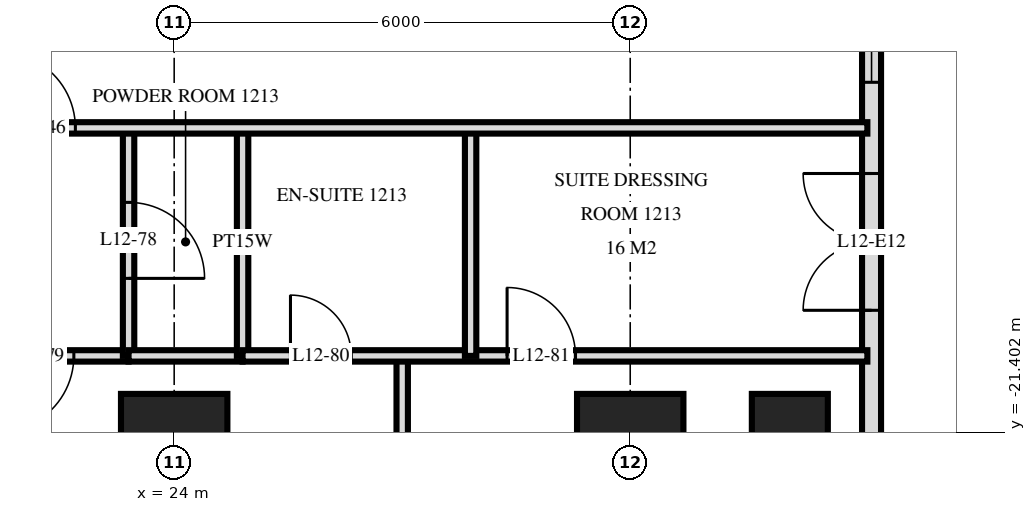
"""IFC4 building model, lengths in metres.
Left out: names, types, materials, properties, quantities, classifications, styles, units other than length and angle.
Written with IfcOpenShell. Run it as: python <this file> out.ifc"""

import sys

from ifc_helpers import new_model, si_unit, direction, frame, frame_2d, origin, origin_2d, place, context, subcontext, project, spatial, rectangle, extrude, element, fill, save


model = new_model("IFC4")
c1 = context("Model", 3, precision=1e-05, world=origin(), true_north=direction((0.0, 1.0)))
c2 = subcontext(c1, "Body", "Model", "MODEL_VIEW")
j1 = project(units=[si_unit("LENGTHUNIT", "METRE"), si_unit("PLANEANGLEUNIT", "RADIAN")], contexts=[c1])
p1 = place(None, origin())
s1 = spatial("IfcSite", under=j1, at=p1, CompositionType="ELEMENT")
p2 = place(p1, origin())
s2 = spatial("IfcBuilding", under=s1, at=p2, CompositionType="ELEMENT")
p3 = place(p2, frame((0.0, 0.0, 52.8)))
s3 = spatial("IfcBuildingStorey", under=s2, at=p3, CompositionType="ELEMENT", Elevation=52.8)
for number, where, z_axis, x_axis in (
    (1, (24.0, -21.6, 0.0), (0.0, 0.0, 1.0), (1.0, 0.0, 0.0)),
    (2, (30.0, -21.6, 0.0), (0.0, 0.0, 1.0), (1.0, 0.0, 0.0)),
):
    element("IfcColumn", number, at=place(p3, frame(where, z_axis=z_axis, x_axis=x_axis)), inside=s3, PredefinedType="COLUMN", context=c2, shape_type="SweptSolid", body=[
        extrude(rectangle(XDim=1.4, YDim=1.4, at=origin_2d()), origin(), (0.0, 0.0, 1.0), 3.6),
    ])
p4 = place(p3, frame((32.1, -21.6, 0.0), z_axis=(0.0, 0.0, 1.0), x_axis=(0.0, 1.0, 0.0)))
e3 = element("IfcColumn", 3, at=p4, inside=s3, PredefinedType="COLUMN", context=c2, shape_type="SweptSolid", body=[
    extrude(rectangle(XDim=1.4, YDim=1.0, at=origin_2d()), origin(), (0.0, 0.0, 1.0), 3.6),
])
p5 = place(p3, frame((33.175, -24.875, 0.0), z_axis=(0.0, 0.0, 1.0), x_axis=(0.0, 1.0, 0.0)))
e4 = element("IfcWall", 4, at=p5, inside=s3, PredefinedType="SOLIDWALL", context=c2, shape_type="SweptSolid", body=[
    extrude(rectangle(XDim=21.551, YDim=0.25, at=frame_2d((10.775, 0.0))), origin(), (0.0, 0.0, 1.0), 3.32),
])
p6 = place(p5, frame((0.575, 0.0, 0.0)))
e5 = element("IfcOpeningElement", 5, at=p6, cuts=e4, PredefinedType="OPENING", context=c2, shape_type="SweptSolid", body=[
    extrude(rectangle(XDim=1.8, YDim=2.4, at=frame_2d((0.9, 1.2))), frame((0.0, 0.135, 0.0), z_axis=(0.0, -1.0, 0.0), x_axis=(1.0, 0.0, 0.0)), (0.0, 0.0, 1.0), 0.27),
])
p7 = place(p5, frame((5.075, 0.0, 0.0)))
e6 = element("IfcOpeningElement", 6, at=p7, cuts=e4, PredefinedType="OPENING", context=c2, shape_type="SweptSolid", body=[
    extrude(rectangle(XDim=1.8, YDim=2.4, at=frame_2d((0.9, 1.2))), frame((0.0, 0.135, 0.0), z_axis=(0.0, -1.0, 0.0), x_axis=(1.0, 0.0, 0.0)), (0.0, 0.0, 1.0), 0.27),
])
p8 = place(p5, frame((8.075, 0.0, 0.3)))
e7 = element("IfcOpeningElement", 7, at=p8, cuts=e4, PredefinedType="OPENING", context=c2, shape_type="SweptSolid", body=[
    extrude(rectangle(XDim=1.2, YDim=2.1, at=frame_2d((0.6, 1.05))), frame((0.0, 0.135, 0.0), z_axis=(0.0, -1.0, 0.0), x_axis=(1.0, 0.0, 0.0)), (0.0, 0.0, 1.0), 0.27),
])
p9 = place(p5, frame((13.1, 0.0, 0.0)))
e8 = element("IfcOpeningElement", 8, at=p9, cuts=e4, PredefinedType="OPENING", context=c2, shape_type="SweptSolid", body=[
    extrude(rectangle(XDim=1.8, YDim=2.4, at=frame_2d((0.9, 1.2))), frame((0.0, 0.135, 0.0), z_axis=(0.0, -1.0, 0.0), x_axis=(1.0, 0.0, 0.0)), (0.0, 0.0, 1.0), 0.27),
])
p10 = place(p3, frame((27.9, -20.4, 0.0), z_axis=(0.0, 0.0, 1.0), x_axis=(0.0, 1.0, 0.0)))
e9 = element("IfcWall", 9, at=p10, inside=s3, PredefinedType="PARTITIONING", context=c2, shape_type="SweptSolid", body=[
    extrude(rectangle(XDim=3.0, YDim=0.15, at=frame_2d((1.5, 0.0))), origin(), (0.0, 0.0, 1.0), 3.32),
])
p11 = place(p3, frame((27.0, -29.22, 0.0), z_axis=(0.0, 0.0, 1.0), x_axis=(0.0, 1.0, 0.0)))
e10 = element("IfcWall", 10, at=p11, inside=s3, PredefinedType="PARTITIONING", context=c2, shape_type="SweptSolid", body=[
    extrude(rectangle(XDim=8.82, YDim=0.15, at=frame_2d((4.41, 0.0))), origin(), (0.0, 0.0, 1.0), 3.32),
])
p12 = place(p11, frame((3.87, 0.0, 0.0)))
e11 = element("IfcOpeningElement", 11, at=p12, cuts=e10, PredefinedType="OPENING", context=c2, shape_type="SweptSolid", body=[
    extrude(rectangle(XDim=0.9, YDim=2.1, at=frame_2d((0.45, 1.05))), frame((0.0, 0.085, 0.0), z_axis=(0.0, -1.0, 0.0), x_axis=(1.0, 0.0, 0.0)), (0.0, 0.0, 1.0), 0.17),
])
p13 = place(p3, frame((24.9, -20.4, 0.0), z_axis=(0.0, 0.0, 1.0), x_axis=(0.0, 1.0, 0.0)))
e12 = element("IfcWall", 12, at=p13, inside=s3, PredefinedType="PLUMBINGWALL", context=c2, shape_type="SweptSolid", body=[
    extrude(rectangle(XDim=3.0, YDim=0.15, at=frame_2d((1.5, 0.0))), origin(), (0.0, 0.0, 1.0), 3.32),
])
p14 = place(p3, frame((23.4, -20.4, 0.0), z_axis=(0.0, 0.0, 1.0), x_axis=(0.0, 1.0, 0.0)))
e13 = element("IfcWall", 13, at=p14, inside=s3, PredefinedType="PARTITIONING", context=c2, shape_type="SweptSolid", body=[
    extrude(rectangle(XDim=3.0, YDim=0.15, at=frame_2d((1.5, 0.0))), origin(), (0.0, 0.0, 1.0), 3.32),
])
p15 = place(p14, frame((1.02, 0.0, 0.0)))
e14 = element("IfcOpeningElement", 14, at=p15, cuts=e13, PredefinedType="OPENING", context=c2, shape_type="SweptSolid", body=[
    extrude(rectangle(XDim=1.0, YDim=2.1, at=frame_2d((0.5, 1.05))), frame((0.0, 0.085, 0.0), z_axis=(0.0, -1.0, 0.0), x_axis=(1.0, 0.0, 0.0)), (0.0, 0.0, 1.0), 0.17),
])
p16 = place(p3, frame((21.0, -20.4, 0.0), z_axis=(0.0, 0.0, 1.0), x_axis=(1.0, 0.0, 0.0)))
e15 = element("IfcWall", 15, at=p16, inside=s3, PredefinedType="PARTITIONING", context=c2, shape_type="SweptSolid", body=[
    extrude(rectangle(XDim=2.4, YDim=0.15, at=frame_2d((1.2, 0.0))), origin(), (0.0, 0.0, 1.0), 3.32),
])
p17 = place(p16, frame((0.68, 0.0, 0.0)))
e16 = element("IfcOpeningElement", 16, at=p17, cuts=e15, PredefinedType="OPENING", context=c2, shape_type="SweptSolid", body=[
    extrude(rectangle(XDim=1.0, YDim=2.1, at=frame_2d((0.5, 1.05))), frame((0.0, 0.085, 0.0), z_axis=(0.0, -1.0, 0.0), x_axis=(1.0, 0.0, 0.0)), (0.0, 0.0, 1.0), 0.17),
])
p18 = place(p3, frame((24.9, -20.4, 0.0), z_axis=(0.0, 0.0, 1.0), x_axis=(1.0, 0.0, 0.0)))
e17 = element("IfcWall", 17, at=p18, inside=s3, PredefinedType="PARTITIONING", context=c2, shape_type="SweptSolid", body=[
    extrude(rectangle(XDim=8.22, YDim=0.15, at=frame_2d((4.11, 0.0))), origin(), (0.0, 0.0, 1.0), 3.32),
])
p19 = place(p18, frame((0.63, 0.0, 0.0)))
e18 = element("IfcOpeningElement", 18, at=p19, cuts=e17, PredefinedType="OPENING", context=c2, shape_type="SweptSolid", body=[
    extrude(rectangle(XDim=0.8, YDim=2.1, at=frame_2d((0.4, 1.05))), frame((0.0, 0.085, 0.0), z_axis=(0.0, -1.0, 0.0), x_axis=(1.0, 0.0, 0.0)), (0.0, 0.0, 1.0), 0.17),
])
p20 = place(p18, frame((3.48, 0.0, 0.0)))
e19 = element("IfcOpeningElement", 19, at=p20, cuts=e17, PredefinedType="OPENING", context=c2, shape_type="SweptSolid", body=[
    extrude(rectangle(XDim=0.9, YDim=2.1, at=frame_2d((0.45, 1.05))), frame((0.0, 0.085, 0.0), z_axis=(0.0, -1.0, 0.0), x_axis=(1.0, 0.0, 0.0)), (0.0, 0.0, 1.0), 0.17),
])
p21 = place(p3, frame((23.4, -20.4, 0.0), z_axis=(0.0, 0.0, 1.0), x_axis=(1.0, 0.0, 0.0)))
e20 = element("IfcWall", 20, at=p21, inside=s3, PredefinedType="PLUMBINGWALL", context=c2, shape_type="SweptSolid", body=[
    extrude(rectangle(XDim=1.5, YDim=0.15, at=frame_2d((0.75, 0.0))), origin(), (0.0, 0.0, 1.0), 3.32),
])
p22 = place(p3, frame((-33.12, -17.4, 0.0), z_axis=(0.0, 0.0, 1.0), x_axis=(1.0, 0.0, 0.0)))
e21 = element("IfcWall", 21, at=p22, inside=s3, PredefinedType="PARTITIONING", context=c2, shape_type="SweptSolid", body=[
    extrude(rectangle(XDim=66.24, YDim=0.15, at=frame_2d((33.12, 0.0))), origin(), (0.0, 0.0, 1.0), 3.32),
])
p23 = place(p22, frame((9.27, 0.0, 0.0)))
e22 = element("IfcOpeningElement", 22, at=p23, cuts=e21, PredefinedType="OPENING", context=c2, shape_type="SweptSolid", body=[
    extrude(rectangle(XDim=1.0, YDim=2.1, at=frame_2d((0.5, 1.05))), frame((0.0, 0.085, 0.0), z_axis=(0.0, -1.0, 0.0), x_axis=(1.0, 0.0, 0.0)), (0.0, 0.0, 1.0), 0.17),
])
p24 = place(p22, frame((13.97, 0.0, 0.0)))
e23 = element("IfcOpeningElement", 23, at=p24, cuts=e21, PredefinedType="OPENING", context=c2, shape_type="SweptSolid", body=[
    extrude(rectangle(XDim=1.0, YDim=2.1, at=frame_2d((0.5, 1.05))), frame((0.0, 0.085, 0.0), z_axis=(0.0, -1.0, 0.0), x_axis=(1.0, 0.0, 0.0)), (0.0, 0.0, 1.0), 0.17),
])
p25 = place(p22, frame((15.27, 0.0, 0.0)))
e24 = element("IfcOpeningElement", 24, at=p25, cuts=e21, PredefinedType="OPENING", context=c2, shape_type="SweptSolid", body=[
    extrude(rectangle(XDim=1.0, YDim=2.1, at=frame_2d((0.5, 1.05))), frame((0.0, 0.085, 0.0), z_axis=(0.0, -1.0, 0.0), x_axis=(1.0, 0.0, 0.0)), (0.0, 0.0, 1.0), 0.17),
])
p26 = place(p22, frame((19.97, 0.0, 0.0)))
e25 = element("IfcOpeningElement", 25, at=p26, cuts=e21, PredefinedType="OPENING", context=c2, shape_type="SweptSolid", body=[
    extrude(rectangle(XDim=1.0, YDim=2.1, at=frame_2d((0.5, 1.05))), frame((0.0, 0.085, 0.0), z_axis=(0.0, -1.0, 0.0), x_axis=(1.0, 0.0, 0.0)), (0.0, 0.0, 1.0), 0.17),
])
p27 = place(p22, frame((22.27, 0.0, 0.0)))
e26 = element("IfcOpeningElement", 26, at=p27, cuts=e21, PredefinedType="OPENING", context=c2, shape_type="SweptSolid", body=[
    extrude(rectangle(XDim=1.0, YDim=2.1, at=frame_2d((0.5, 1.05))), frame((0.0, 0.085, 0.0), z_axis=(0.0, -1.0, 0.0), x_axis=(1.0, 0.0, 0.0)), (0.0, 0.0, 1.0), 0.17),
])
p28 = place(p22, frame((28.97, 0.0, 0.0)))
e27 = element("IfcOpeningElement", 27, at=p28, cuts=e21, PredefinedType="OPENING", context=c2, shape_type="SweptSolid", body=[
    extrude(rectangle(XDim=1.0, YDim=2.1, at=frame_2d((0.5, 1.05))), frame((0.0, 0.085, 0.0), z_axis=(0.0, -1.0, 0.0), x_axis=(1.0, 0.0, 0.0)), (0.0, 0.0, 1.0), 0.17),
])
p29 = place(p22, frame((30.27, 0.0, 0.0)))
e28 = element("IfcOpeningElement", 28, at=p29, cuts=e21, PredefinedType="OPENING", context=c2, shape_type="SweptSolid", body=[
    extrude(rectangle(XDim=1.0, YDim=2.1, at=frame_2d((0.5, 1.05))), frame((0.0, 0.085, 0.0), z_axis=(0.0, -1.0, 0.0), x_axis=(1.0, 0.0, 0.0)), (0.0, 0.0, 1.0), 0.17),
])
p30 = place(p22, frame((34.97, 0.0, 0.0)))
e29 = element("IfcOpeningElement", 29, at=p30, cuts=e21, PredefinedType="OPENING", context=c2, shape_type="SweptSolid", body=[
    extrude(rectangle(XDim=1.0, YDim=2.1, at=frame_2d((0.5, 1.05))), frame((0.0, 0.085, 0.0), z_axis=(0.0, -1.0, 0.0), x_axis=(1.0, 0.0, 0.0)), (0.0, 0.0, 1.0), 0.17),
])
p31 = place(p22, frame((36.27, 0.0, 0.0)))
e30 = element("IfcOpeningElement", 30, at=p31, cuts=e21, PredefinedType="OPENING", context=c2, shape_type="SweptSolid", body=[
    extrude(rectangle(XDim=1.0, YDim=2.1, at=frame_2d((0.5, 1.05))), frame((0.0, 0.085, 0.0), z_axis=(0.0, -1.0, 0.0), x_axis=(1.0, 0.0, 0.0)), (0.0, 0.0, 1.0), 0.17),
])
p32 = place(p22, frame((39.82, 0.0, 0.0)))
e31 = element("IfcOpeningElement", 31, at=p32, cuts=e21, PredefinedType="OPENING", context=c2, shape_type="SweptSolid", body=[
    extrude(rectangle(XDim=1.0, YDim=2.1, at=frame_2d((0.5, 1.05))), frame((0.0, 0.085, 0.0), z_axis=(0.0, -1.0, 0.0), x_axis=(1.0, 0.0, 0.0)), (0.0, 0.0, 1.0), 0.17),
])
p33 = place(p22, frame((51.27, 0.0, 0.0)))
e32 = element("IfcOpeningElement", 32, at=p33, cuts=e21, PredefinedType="OPENING", context=c2, shape_type="SweptSolid", body=[
    extrude(rectangle(XDim=1.0, YDim=2.1, at=frame_2d((0.5, 1.05))), frame((0.0, 0.085, 0.0), z_axis=(0.0, -1.0, 0.0), x_axis=(1.0, 0.0, 0.0)), (0.0, 0.0, 1.0), 0.17),
])
p34 = place(p22, frame((4.42, 0.0, 0.0)))
e33 = element("IfcOpeningElement", 33, at=p34, cuts=e21, PredefinedType="OPENING", context=c2, shape_type="SweptSolid", body=[
    extrude(rectangle(XDim=1.0, YDim=2.1, at=frame_2d((0.5, 1.05))), frame((0.0, 0.085, 0.0), z_axis=(0.0, -1.0, 0.0), x_axis=(1.0, 0.0, 0.0)), (0.0, 0.0, 1.0), 0.17),
])
p35 = place(p22, frame((54.82, 0.0, 0.0)))
e34 = element("IfcOpeningElement", 34, at=p35, cuts=e21, PredefinedType="OPENING", context=c2, shape_type="SweptSolid", body=[
    extrude(rectangle(XDim=1.0, YDim=2.1, at=frame_2d((0.5, 1.05))), frame((0.0, 0.085, 0.0), z_axis=(0.0, -1.0, 0.0), x_axis=(1.0, 0.0, 0.0)), (0.0, 0.0, 1.0), 0.17),
])
p36 = place(p7, origin())
e35 = element("IfcDoor", 35, at=p36, inside=s3, OperationType="DOUBLE_DOOR_SINGLE_SWING", PredefinedType="DOOR", context=c2, shape_type="SweptSolid", body=[
    extrude(rectangle(XDim=1.8, YDim=2.4, at=frame_2d((0.9, 1.2))), frame((0.0, 0.025, 0.0), z_axis=(0.0, -1.0, 0.0), x_axis=(1.0, 0.0, 0.0)), (0.0, 0.0, 1.0), 0.05),
])
fill(e6, e35)
p37 = place(p8, origin())
e36 = element("IfcWindow", 36, at=p37, inside=s3, PartitioningType="SINGLE_PANEL", PredefinedType="WINDOW", context=c2, shape_type="SweptSolid", body=[
    extrude(rectangle(XDim=1.2, YDim=2.1, at=frame_2d((0.6, 1.05))), frame((0.0, 0.03, 0.0), z_axis=(0.0, -1.0, 0.0), x_axis=(1.0, 0.0, 0.0)), (0.0, 0.0, 1.0), 0.06),
])
fill(e7, e36)
p38 = place(p35, origin())
e37 = element("IfcDoor", 37, at=p38, inside=s3, OperationType="SINGLE_SWING_RIGHT", PredefinedType="DOOR", context=c2, shape_type="SweptSolid", body=[
    extrude(rectangle(XDim=1.0, YDim=2.1, at=frame_2d((0.5, 1.05))), frame((0.0, 0.025, 0.0), z_axis=(0.0, -1.0, 0.0), x_axis=(1.0, 0.0, 0.0)), (0.0, 0.0, 1.0), 0.05),
])
fill(e34, e37)
p39 = place(p15, frame((0.5, 0.0, 0.0), z_axis=(0.0, 0.0, 1.0), x_axis=(-1.0, 0.0, 0.0)))
e38 = element("IfcDoor", 38, at=p39, inside=s3, OperationType="SINGLE_SWING_LEFT", PredefinedType="DOOR", context=c2, shape_type="SweptSolid", body=[
    extrude(rectangle(XDim=1.0, YDim=2.1, at=frame_2d((0.0, 1.05))), frame((0.0, -0.025, 0.0), z_axis=(0.0, 1.0, 0.0), x_axis=(-1.0, 0.0, 0.0)), (0.0, 0.0, 1.0), 0.05),
])
fill(e14, e38)
p40 = place(p17, frame((0.5, 0.0, 0.0), z_axis=(0.0, 0.0, 1.0), x_axis=(-1.0, 0.0, 0.0)))
e39 = element("IfcDoor", 39, at=p40, inside=s3, OperationType="SINGLE_SWING_LEFT", PredefinedType="DOOR", context=c2, shape_type="SweptSolid", body=[
    extrude(rectangle(XDim=1.0, YDim=2.1, at=frame_2d((0.0, 1.05))), frame((0.0, -0.025, 0.0), z_axis=(0.0, 1.0, 0.0), x_axis=(-1.0, 0.0, 0.0)), (0.0, 0.0, 1.0), 0.05),
])
fill(e16, e39)
p41 = place(p19, origin())
e40 = element("IfcDoor", 40, at=p41, inside=s3, OperationType="SINGLE_SWING_RIGHT", PredefinedType="DOOR", context=c2, shape_type="SweptSolid", body=[
    extrude(rectangle(XDim=0.8, YDim=2.1, at=frame_2d((0.4, 1.05))), frame((0.0, 0.025, 0.0), z_axis=(0.0, -1.0, 0.0), x_axis=(1.0, 0.0, 0.0)), (0.0, 0.0, 1.0), 0.05),
])
fill(e18, e40)
p42 = place(p20, origin())
e41 = element("IfcDoor", 41, at=p42, inside=s3, OperationType="SINGLE_SWING_RIGHT", PredefinedType="DOOR", context=c2, shape_type="SweptSolid", body=[
    extrude(rectangle(XDim=0.9, YDim=2.1, at=frame_2d((0.45, 1.05))), frame((0.0, 0.025, 0.0), z_axis=(0.0, -1.0, 0.0), x_axis=(1.0, 0.0, 0.0)), (0.0, 0.0, 1.0), 0.05),
])
fill(e19, e41)
save(model, sys.argv[1])
